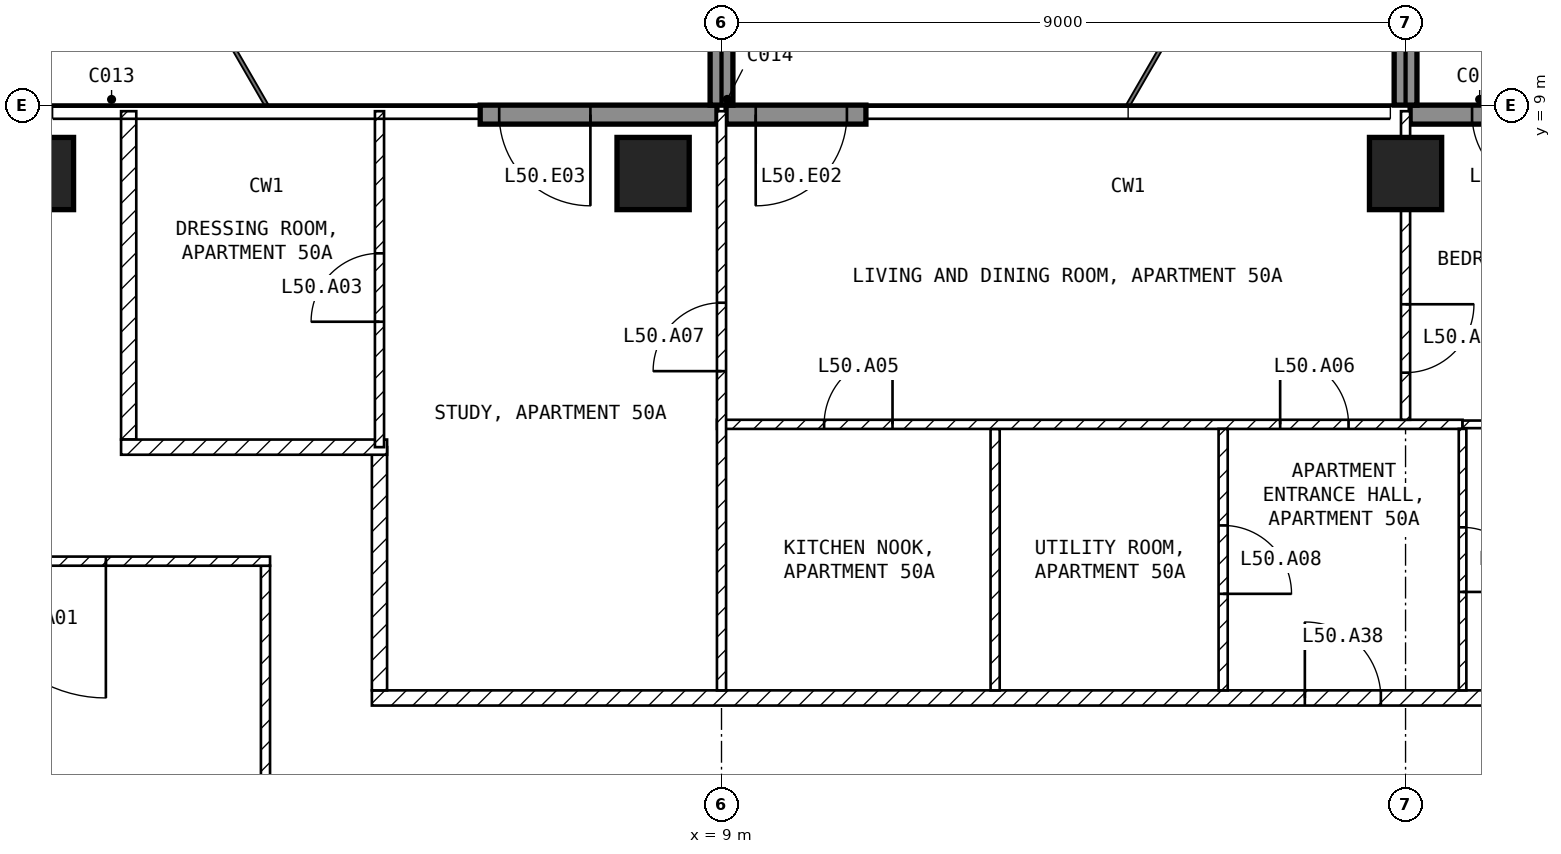
"""IFC4 building model, lengths in metres.
Left out: names, types, materials, properties, quantities, classifications, styles, units other than length and angle.
Written with IfcOpenShell. Run it as: python <this file> out.ifc"""

import sys

from ifc_helpers import new_model, si_unit, direction, frame, frame_2d, origin, origin_2d, place, context, subcontext, project, spatial, rectangle, extrude, element, fill, save


model = new_model("IFC4")
c1 = context("Model", 3, precision=1e-05, world=origin(), true_north=direction((0.0, 1.0)))
c2 = subcontext(c1, "Body", "Model", "MODEL_VIEW")
j1 = project(units=[si_unit("LENGTHUNIT", "METRE"), si_unit("PLANEANGLEUNIT", "RADIAN")], contexts=[c1])
p1 = place(None, origin())
s1 = spatial("IfcSite", under=j1, at=p1, CompositionType="ELEMENT")
p2 = place(p1, origin())
s2 = spatial("IfcBuilding", under=s1, at=p2, CompositionType="ELEMENT")
p3 = place(p2, frame((0.0, 0.0, 201.6)))
s3 = spatial("IfcBuildingStorey", under=s2, at=p3, CompositionType="ELEMENT", Elevation=201.6)
for number, where, z_axis, x_axis in (
    (1, (0.0, 8.1, -0.25), (0.0, 0.0, 1.0), (1.0, 0.0, 0.0)),
    (2, (8.1, 8.1, -0.25), (0.0, 0.0, 1.0), (1.0, 0.0, 0.0)),
    (3, (18.0, 8.1, -0.25), (0.0, 0.0, 1.0), (1.0, 0.0, 0.0)),
):
    element("IfcColumn", number, at=place(p3, frame(where, z_axis=z_axis, x_axis=x_axis)), inside=s3, PredefinedType="COLUMN", context=c2, shape_type="SweptSolid", body=[
        extrude(rectangle(XDim=0.95, YDim=0.95, at=origin_2d()), origin(), (0.0, 0.0, 1.0), 3.5),
    ])
p4 = place(p3, frame((21.175, 8.875, 0.0), z_axis=(0.0, 0.0, 1.0), x_axis=(-1.0, 0.0, 0.0)))
e4 = element("IfcWall", 4, at=p4, inside=s3, PredefinedType="SOLIDWALL", context=c2, shape_type="SweptSolid", body=[
    extrude(rectangle(XDim=3.115, YDim=0.25, at=frame_2d((1.558, 0.0))), origin(), (0.0, 0.0, 1.0), 3.25),
])
p5 = place(p4, frame((1.3, 0.0, 0.0)))
e5 = element("IfcOpeningElement", 5, at=p5, cuts=e4, PredefinedType="OPENING", context=c2, shape_type="SweptSolid", body=[
    extrude(rectangle(XDim=1.0, YDim=2.4, at=frame_2d((0.5, 1.2))), frame((0.0, 0.135, 0.0), z_axis=(0.0, -1.0, 0.0), x_axis=(1.0, 0.0, 0.0)), (0.0, 0.0, 1.0), 0.27),
])
p6 = place(p3, frame((10.9, 8.875, 0.0), z_axis=(0.0, 0.0, 1.0), x_axis=(-1.0, 0.0, 0.0)))
e6 = element("IfcWall", 6, at=p6, inside=s3, PredefinedType="SOLIDWALL", context=c2, shape_type="SweptSolid", body=[
    extrude(rectangle(XDim=1.84, YDim=0.25, at=frame_2d((0.92, 0.0))), origin(), (0.0, 0.0, 1.0), 3.25),
])
p7 = place(p6, frame((0.25, 0.0, 0.0)))
e7 = element("IfcOpeningElement", 7, at=p7, cuts=e6, PredefinedType="OPENING", context=c2, shape_type="SweptSolid", body=[
    extrude(rectangle(XDim=1.2, YDim=2.4, at=frame_2d((0.6, 1.2))), frame((0.0, 0.135, 0.0), z_axis=(0.0, -1.0, 0.0), x_axis=(1.0, 0.0, 0.0)), (0.0, 0.0, 1.0), 0.27),
])
p8 = place(p3, frame((8.94, 8.875, 0.0), z_axis=(0.0, 0.0, 1.0), x_axis=(-1.0, 0.0, 0.0)))
e8 = element("IfcWall", 8, at=p8, inside=s3, PredefinedType="SOLIDWALL", context=c2, shape_type="SweptSolid", body=[
    extrude(rectangle(XDim=3.115, YDim=0.25, at=frame_2d((1.558, 0.0))), origin(), (0.0, 0.0, 1.0), 3.25),
])
p9 = place(p8, frame((1.665, 0.0, 0.0)))
e9 = element("IfcOpeningElement", 9, at=p9, cuts=e8, PredefinedType="OPENING", context=c2, shape_type="SweptSolid", body=[
    extrude(rectangle(XDim=1.2, YDim=2.4, at=frame_2d((0.6, 1.2))), frame((0.0, 0.135, 0.0), z_axis=(0.0, -1.0, 0.0), x_axis=(1.0, 0.0, 0.0)), (0.0, 0.0, 1.0), 0.27),
])
for number, where, z_axis, x_axis in (
    (10, (9.0, 9.0, 0.0), (0.0, 0.0, 1.0), (0.0, 1.0, 0.0)),
    (11, (18.0, 9.0, 0.0), (0.0, 0.0, 1.0), (0.0, 1.0, 0.0)),
):
    element("IfcWall", number, at=place(p3, frame(where, z_axis=z_axis, x_axis=x_axis)), inside=s3, PredefinedType="SOLIDWALL", context=c2, shape_type="SweptSolid", body=[
        extrude(rectangle(XDim=2.7, YDim=0.3, at=frame_2d((1.35, 0.0))), origin(), (0.0, 0.0, 1.0), 3.25),
    ])
p10 = place(p3, frame((3.0, -2.94, 0.0), z_axis=(0.0, 0.0, 1.0), x_axis=(0.0, 1.0, 0.0)))
e12 = element("IfcWall", 12, at=p10, inside=s3, PredefinedType="PARTITIONING", context=c2, shape_type="SweptSolid", body=[
    extrude(rectangle(XDim=5.88, YDim=0.12, at=frame_2d((2.94, 0.0))), origin(), (0.0, 0.0, 1.0), 3.25),
])
p11 = place(p3, frame((3.06, 3.0, 0.0), z_axis=(0.0, 0.0, 1.0), x_axis=(-1.0, 0.0, 0.0)))
e13 = element("IfcWall", 13, at=p11, inside=s3, PredefinedType="PARTITIONING", context=c2, shape_type="SweptSolid", body=[
    extrude(rectangle(XDim=6.12, YDim=0.12, at=frame_2d((3.06, 0.0))), origin(), (0.0, 0.0, 1.0), 3.25),
])
p12 = place(p11, frame((2.16, 0.0, 0.0)))
e14 = element("IfcOpeningElement", 14, at=p12, cuts=e13, PredefinedType="OPENING", context=c2, shape_type="SweptSolid", body=[
    extrude(rectangle(XDim=1.8, YDim=2.1, at=frame_2d((0.9, 1.05))), frame((0.0, 0.07, 0.0), z_axis=(0.0, -1.0, 0.0), x_axis=(1.0, 0.0, 0.0)), (0.0, 0.0, 1.0), 0.14),
])
p13 = place(p3, frame((4.4, 1.2, 0.0), z_axis=(0.0, 0.0, 1.0), x_axis=(1.0, 0.0, 0.0)))
e15 = element("IfcWall", 15, at=p13, inside=s3, PredefinedType="PARTITIONING", context=c2, shape_type="SweptSolid", body=[
    extrude(rectangle(XDim=17.2, YDim=0.2, at=frame_2d((8.6, 0.0))), origin(), (0.0, 0.0, 1.0), 3.25),
])
p14 = place(p13, frame((12.275, 0.0, 0.0)))
e16 = element("IfcOpeningElement", 16, at=p14, cuts=e15, PredefinedType="OPENING", context=c2, shape_type="SweptSolid", body=[
    extrude(rectangle(XDim=1.0, YDim=2.1, at=frame_2d((0.5, 1.05))), frame((0.0, 0.11, 0.0), z_axis=(0.0, -1.0, 0.0), x_axis=(1.0, 0.0, 0.0)), (0.0, 0.0, 1.0), 0.22),
])
p15 = place(p3, frame((4.5, 4.5, 0.0), z_axis=(0.0, 0.0, 1.0), x_axis=(0.0, -1.0, 0.0)))
e17 = element("IfcWall", 17, at=p15, inside=s3, PredefinedType="PARTITIONING", context=c2, shape_type="SweptSolid", body=[
    extrude(rectangle(XDim=3.2, YDim=0.2, at=frame_2d((1.6, 0.0))), origin(), (0.0, 0.0, 1.0), 3.25),
])
p16 = place(p3, frame((1.2, 8.92, 0.0), z_axis=(0.0, 0.0, 1.0), x_axis=(0.0, -1.0, 0.0)))
e18 = element("IfcWall", 18, at=p16, inside=s3, PredefinedType="PARTITIONING", context=c2, shape_type="SweptSolid", body=[
    extrude(rectangle(XDim=4.32, YDim=0.2, at=frame_2d((2.16, 0.0))), origin(), (0.0, 0.0, 1.0), 3.25),
])
p17 = place(p3, frame((1.1, 4.5, 0.0), z_axis=(0.0, 0.0, 1.0), x_axis=(1.0, 0.0, 0.0)))
e19 = element("IfcWall", 19, at=p17, inside=s3, PredefinedType="PARTITIONING", context=c2, shape_type="SweptSolid", body=[
    extrude(rectangle(XDim=3.5, YDim=0.2, at=frame_2d((1.75, 0.0))), origin(), (0.0, 0.0, 1.0), 3.25),
])
p18 = place(p3, frame((12.6, 4.74, 0.0), z_axis=(0.0, 0.0, 1.0), x_axis=(0.0, -1.0, 0.0)))
e20 = element("IfcWall", 20, at=p18, inside=s3, PredefinedType="PARTITIONING", context=c2, shape_type="SweptSolid", body=[
    extrude(rectangle(XDim=3.44, YDim=0.12, at=frame_2d((1.72, 0.0))), origin(), (0.0, 0.0, 1.0), 3.25),
])
p19 = place(p3, frame((8.94, 4.8, 0.0), z_axis=(0.0, 0.0, 1.0), x_axis=(1.0, 0.0, 0.0)))
e21 = element("IfcWall", 21, at=p19, inside=s3, PredefinedType="PARTITIONING", context=c2, shape_type="SweptSolid", body=[
    extrude(rectangle(XDim=9.81, YDim=0.12, at=frame_2d((4.905, 0.0))), origin(), (0.0, 0.0, 1.0), 3.25),
])
p20 = place(p19, frame((1.41, 0.0, 0.0)))
e22 = element("IfcOpeningElement", 22, at=p20, cuts=e21, PredefinedType="OPENING", context=c2, shape_type="SweptSolid", body=[
    extrude(rectangle(XDim=0.9, YDim=2.1, at=frame_2d((0.45, 1.05))), frame((0.0, 0.07, 0.0), z_axis=(0.0, -1.0, 0.0), x_axis=(1.0, 0.0, 0.0)), (0.0, 0.0, 1.0), 0.14),
])
p21 = place(p19, frame((7.41, 0.0, 0.0)))
e23 = element("IfcOpeningElement", 23, at=p21, cuts=e21, PredefinedType="OPENING", context=c2, shape_type="SweptSolid", body=[
    extrude(rectangle(XDim=0.9, YDim=2.1, at=frame_2d((0.45, 1.05))), frame((0.0, 0.07, 0.0), z_axis=(0.0, -1.0, 0.0), x_axis=(1.0, 0.0, 0.0)), (0.0, 0.0, 1.0), 0.14),
])
p22 = place(p3, frame((9.0, 1.3, 0.0), z_axis=(0.0, 0.0, 1.0), x_axis=(0.0, 1.0, 0.0)))
e24 = element("IfcWall", 24, at=p22, inside=s3, PredefinedType="PARTITIONING", context=c2, shape_type="SweptSolid", body=[
    extrude(rectangle(XDim=7.62, YDim=0.12, at=frame_2d((3.81, 0.0))), origin(), (0.0, 0.0, 1.0), 3.25),
])
p23 = place(p22, frame((4.2, 0.0, 0.0)))
e25 = element("IfcOpeningElement", 25, at=p23, cuts=e24, PredefinedType="OPENING", context=c2, shape_type="SweptSolid", body=[
    extrude(rectangle(XDim=0.9, YDim=2.1, at=frame_2d((0.45, 1.05))), frame((0.0, 0.07, 0.0), z_axis=(0.0, -1.0, 0.0), x_axis=(1.0, 0.0, 0.0)), (0.0, 0.0, 1.0), 0.14),
])
p24 = place(p3, frame((15.6, 4.74, 0.0), z_axis=(0.0, 0.0, 1.0), x_axis=(0.0, -1.0, 0.0)))
e26 = element("IfcWall", 26, at=p24, inside=s3, PredefinedType="PARTITIONING", context=c2, shape_type="SweptSolid", body=[
    extrude(rectangle(XDim=3.44, YDim=0.12, at=frame_2d((1.72, 0.0))), origin(), (0.0, 0.0, 1.0), 3.25),
])
p25 = place(p24, frame((1.27, 0.0, 0.0)))
e27 = element("IfcOpeningElement", 27, at=p25, cuts=e26, PredefinedType="OPENING", context=c2, shape_type="SweptSolid", body=[
    extrude(rectangle(XDim=0.9, YDim=2.1, at=frame_2d((0.45, 1.05))), frame((0.0, 0.07, 0.0), z_axis=(0.0, -1.0, 0.0), x_axis=(1.0, 0.0, 0.0)), (0.0, 0.0, 1.0), 0.14),
])
p26 = place(p3, frame((18.75, 4.74, 0.0), z_axis=(0.0, 0.0, 1.0), x_axis=(0.0, -1.0, 0.0)))
e28 = element("IfcWall", 28, at=p26, inside=s3, PredefinedType="PARTITIONING", context=c2, shape_type="SweptSolid", body=[
    extrude(rectangle(XDim=3.44, YDim=0.1, at=frame_2d((1.72, 0.0))), origin(), (0.0, 0.0, 1.0), 3.25),
])
p27 = place(p26, frame((1.295, 0.0, 0.0)))
e29 = element("IfcOpeningElement", 29, at=p27, cuts=e28, PredefinedType="OPENING", context=c2, shape_type="SweptSolid", body=[
    extrude(rectangle(XDim=0.85, YDim=2.1, at=frame_2d((0.425, 1.05))), frame((0.0, 0.06, 0.0), z_axis=(0.0, -1.0, 0.0), x_axis=(1.0, 0.0, 0.0)), (0.0, 0.0, 1.0), 0.12),
])
p28 = place(p3, frame((18.75, 4.8, 0.0), z_axis=(0.0, 0.0, 1.0), x_axis=(1.0, 0.0, 0.0)))
e30 = element("IfcWall", 30, at=p28, inside=s3, PredefinedType="PARTITIONING", context=c2, shape_type="SweptSolid", body=[
    extrude(rectangle(XDim=2.85, YDim=0.1, at=frame_2d((1.425, 0.0))), origin(), (0.0, 0.0, 1.0), 3.25),
])
p29 = place(p3, frame((18.0, 8.92, 0.0), z_axis=(0.0, 0.0, 1.0), x_axis=(0.0, -1.0, 0.0)))
e31 = element("IfcWall", 31, at=p29, inside=s3, PredefinedType="PARTITIONING", context=c2, shape_type="SweptSolid", body=[
    extrude(rectangle(XDim=4.06, YDim=0.12, at=frame_2d((2.03, 0.0))), origin(), (0.0, 0.0, 1.0), 2.48),
])
p30 = place(p29, frame((2.54, 0.0, 0.0)))
e32 = element("IfcOpeningElement", 32, at=p30, cuts=e31, PredefinedType="OPENING", context=c2, shape_type="SweptSolid", body=[
    extrude(rectangle(XDim=0.9, YDim=2.1, at=frame_2d((0.45, 1.05))), frame((0.0, 0.07, 0.0), z_axis=(0.0, -1.0, 0.0), x_axis=(1.0, 0.0, 0.0)), (0.0, 0.0, 1.0), 0.14),
])
p31 = place(p3, frame((4.5, 4.5, 0.0), z_axis=(0.0, 0.0, 1.0), x_axis=(0.0, 1.0, 0.0)))
e33 = element("IfcWall", 33, at=p31, inside=s3, PredefinedType="PARTITIONING", context=c2, shape_type="SweptSolid", body=[
    extrude(rectangle(XDim=4.42, YDim=0.12, at=frame_2d((2.21, 0.0))), origin(), (0.0, 0.0, 1.0), 3.25),
])
p32 = place(p31, frame((1.65, 0.0, 0.0)))
e34 = element("IfcOpeningElement", 34, at=p32, cuts=e33, PredefinedType="OPENING", context=c2, shape_type="SweptSolid", body=[
    extrude(rectangle(XDim=0.9, YDim=2.1, at=frame_2d((0.45, 1.05))), frame((0.0, 0.07, 0.0), z_axis=(0.0, -1.0, 0.0), x_axis=(1.0, 0.0, 0.0)), (0.0, 0.0, 1.0), 0.14),
])
p33 = place(p5, origin())
e35 = element("IfcDoor", 35, at=p33, inside=s3, OperationType="SINGLE_SWING_LEFT", PredefinedType="DOOR", context=c2, shape_type="SweptSolid", body=[
    extrude(rectangle(XDim=1.0, YDim=2.4, at=frame_2d((0.5, 1.2))), frame((0.0, 0.025, 0.0), z_axis=(0.0, -1.0, 0.0), x_axis=(1.0, 0.0, 0.0)), (0.0, 0.0, 1.0), 0.05),
])
fill(e5, e35)
p34 = place(p7, origin())
e36 = element("IfcDoor", 36, at=p34, inside=s3, OperationType="SINGLE_SWING_RIGHT", PredefinedType="DOOR", context=c2, shape_type="SweptSolid", body=[
    extrude(rectangle(XDim=1.2, YDim=2.4, at=frame_2d((0.6, 1.2))), frame((0.0, 0.025, 0.0), z_axis=(0.0, -1.0, 0.0), x_axis=(1.0, 0.0, 0.0)), (0.0, 0.0, 1.0), 0.05),
])
fill(e7, e36)
p35 = place(p9, origin())
e37 = element("IfcDoor", 37, at=p35, inside=s3, OperationType="SINGLE_SWING_LEFT", PredefinedType="DOOR", context=c2, shape_type="SweptSolid", body=[
    extrude(rectangle(XDim=1.2, YDim=2.4, at=frame_2d((0.6, 1.2))), frame((0.0, 0.025, 0.0), z_axis=(0.0, -1.0, 0.0), x_axis=(1.0, 0.0, 0.0)), (0.0, 0.0, 1.0), 0.05),
])
fill(e9, e37)
p36 = place(p12, origin())
e38 = element("IfcDoor", 38, at=p36, inside=s3, OperationType="SINGLE_SWING_LEFT", PredefinedType="DOOR", context=c2, shape_type="SweptSolid", body=[
    extrude(rectangle(XDim=1.8, YDim=2.1, at=frame_2d((0.9, 1.05))), frame((0.0, 0.025, 0.0), z_axis=(0.0, -1.0, 0.0), x_axis=(1.0, 0.0, 0.0)), (0.0, 0.0, 1.0), 0.05),
])
fill(e14, e38)
p37 = place(p30, origin())
e39 = element("IfcDoor", 39, at=p37, inside=s3, OperationType="SINGLE_SWING_LEFT", PredefinedType="DOOR", context=c2, shape_type="SweptSolid", body=[
    extrude(rectangle(XDim=0.9, YDim=2.1, at=frame_2d((0.45, 1.05))), frame((0.0, 0.025, 0.0), z_axis=(0.0, -1.0, 0.0), x_axis=(1.0, 0.0, 0.0)), (0.0, 0.0, 1.0), 0.05),
])
fill(e32, e39)
p38 = place(p32, origin())
e40 = element("IfcDoor", 40, at=p38, inside=s3, OperationType="SINGLE_SWING_LEFT", PredefinedType="DOOR", context=c2, shape_type="SweptSolid", body=[
    extrude(rectangle(XDim=0.9, YDim=2.1, at=frame_2d((0.45, 1.05))), frame((0.0, 0.025, 0.0), z_axis=(0.0, -1.0, 0.0), x_axis=(1.0, 0.0, 0.0)), (0.0, 0.0, 1.0), 0.05),
])
fill(e34, e40)
p39 = place(p27, origin())
e41 = element("IfcDoor", 41, at=p39, inside=s3, OperationType="SINGLE_SWING_RIGHT", PredefinedType="DOOR", context=c2, shape_type="SweptSolid", body=[
    extrude(rectangle(XDim=0.85, YDim=2.1, at=frame_2d((0.425, 1.05))), frame((0.0, 0.025, 0.0), z_axis=(0.0, -1.0, 0.0), x_axis=(1.0, 0.0, 0.0)), (0.0, 0.0, 1.0), 0.05),
])
fill(e29, e41)
p40 = place(p20, origin())
e42 = element("IfcDoor", 42, at=p40, inside=s3, OperationType="SINGLE_SWING_RIGHT", PredefinedType="DOOR", context=c2, shape_type="SweptSolid", body=[
    extrude(rectangle(XDim=0.9, YDim=2.1, at=frame_2d((0.45, 1.05))), frame((0.0, 0.025, 0.0), z_axis=(0.0, -1.0, 0.0), x_axis=(1.0, 0.0, 0.0)), (0.0, 0.0, 1.0), 0.05),
])
fill(e22, e42)
p41 = place(p21, origin())
e43 = element("IfcDoor", 43, at=p41, inside=s3, OperationType="SINGLE_SWING_LEFT", PredefinedType="DOOR", context=c2, shape_type="SweptSolid", body=[
    extrude(rectangle(XDim=0.9, YDim=2.1, at=frame_2d((0.45, 1.05))), frame((0.0, 0.025, 0.0), z_axis=(0.0, -1.0, 0.0), x_axis=(1.0, 0.0, 0.0)), (0.0, 0.0, 1.0), 0.05),
])
fill(e23, e43)
p42 = place(p23, origin())
e44 = element("IfcDoor", 44, at=p42, inside=s3, OperationType="SINGLE_SWING_LEFT", PredefinedType="DOOR", context=c2, shape_type="SweptSolid", body=[
    extrude(rectangle(XDim=0.9, YDim=2.1, at=frame_2d((0.45, 1.05))), frame((0.0, 0.025, 0.0), z_axis=(0.0, -1.0, 0.0), x_axis=(1.0, 0.0, 0.0)), (0.0, 0.0, 1.0), 0.05),
])
fill(e25, e44)
p43 = place(p25, origin())
e45 = element("IfcDoor", 45, at=p43, inside=s3, OperationType="SINGLE_SWING_RIGHT", PredefinedType="DOOR", context=c2, shape_type="SweptSolid", body=[
    extrude(rectangle(XDim=0.9, YDim=2.1, at=frame_2d((0.45, 1.05))), frame((0.0, 0.025, 0.0), z_axis=(0.0, -1.0, 0.0), x_axis=(1.0, 0.0, 0.0)), (0.0, 0.0, 1.0), 0.05),
])
fill(e27, e45)
p44 = place(p14, origin())
e46 = element("IfcDoor", 46, at=p44, inside=s3, OperationType="SINGLE_SWING_LEFT", PredefinedType="DOOR", context=c2, shape_type="SweptSolid", body=[
    extrude(rectangle(XDim=1.0, YDim=2.1, at=frame_2d((0.5, 1.05))), frame((0.0, 0.025, 0.0), z_axis=(0.0, -1.0, 0.0), x_axis=(1.0, 0.0, 0.0)), (0.0, 0.0, 1.0), 0.05),
])
fill(e16, e46)
save(model, sys.argv[1])
